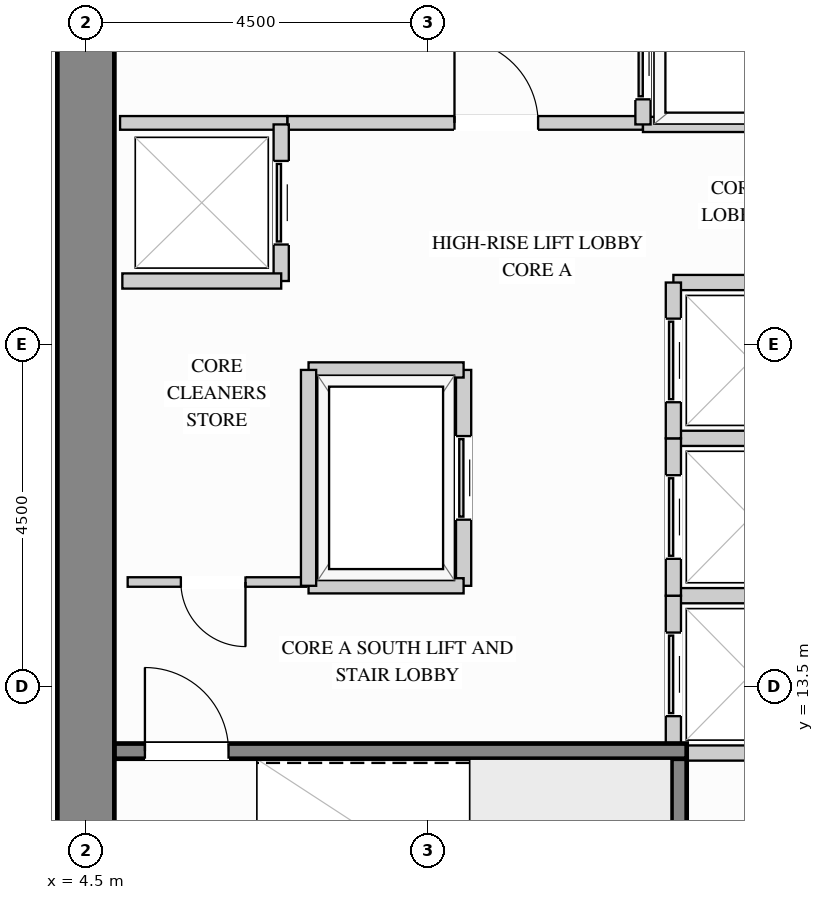
"""IFC4 building model, lengths in metres.
Left out: names, types, materials, properties, quantities, classifications, styles, units other than length and angle.
Written with IfcOpenShell. Run it as: python <this file> out.ifc"""

import sys

from ifc_helpers import new_model, si_unit, direction, frame, frame_2d, origin, place, context, subcontext, project, spatial, rectangle, extrude, source, transform, mapped, element, fill, save


model = new_model("IFC4")
c1 = context("Model", 3, precision=1e-05, world=origin(), true_north=direction((0.0, 1.0)))
c2 = subcontext(c1, "Body", "Model", "MODEL_VIEW")
j1 = project(units=[si_unit("LENGTHUNIT", "METRE"), si_unit("PLANEANGLEUNIT", "RADIAN")], contexts=[c1])
p1 = place(None, origin())
s1 = spatial("IfcSite", under=j1, at=p1, CompositionType="ELEMENT")
p2 = place(p1, origin())
s2 = spatial("IfcBuilding", under=s1, at=p2, CompositionType="ELEMENT")
p3 = place(p2, frame((0.0, 0.0, 113.4)))
s3 = spatial("IfcBuildingStorey", under=s2, at=p3, CompositionType="ELEMENT", Elevation=113.4)
m1 = source(origin(), c2, "Body", "SweptSolid", [
    extrude(rectangle(XDim=20.25, YDim=0.75, at=frame_2d((10.125, 0.0))), origin(), (0.0, 0.0, 1.0), 3.38),
])
p4 = place(p3, frame((4.5, 8.875, 0.0), z_axis=(0.0, 0.0, 1.0), x_axis=(0.0, 1.0, 0.0)))
e1 = element("IfcWall", 1, at=p4, inside=s3, PredefinedType="SHEAR", context=c2, shape_type="MappedRepresentation", body=[
    mapped(m1, transform((0.0, 0.0, 0.0), x_axis=(1.0, 0.0, 0.0), y_axis=(0.0, 1.0, 0.0), z_axis=(0.0, 0.0, 1.0))),
])
p5 = place(p3, frame((7.15, 20.92, 0.0), z_axis=(0.0, 0.0, 1.0), x_axis=(1.0, 0.0, 0.0)))
e2 = element("IfcWall", 2, at=p5, inside=s3, PredefinedType="PARTITIONING", context=c2, shape_type="SweptSolid", body=[
    extrude(rectangle(XDim=4.68, YDim=0.18, at=frame_2d((2.34, 0.0))), origin(), (0.0, 0.0, 1.0), 3.365),
])
p6 = place(p5, frame((2.2, 0.0, 0.0)))
e3 = element("IfcOpeningElement", 3, at=p6, cuts=e2, PredefinedType="OPENING", context=c2, shape_type="SweptSolid", body=[
    extrude(rectangle(XDim=1.1, YDim=2.15, at=frame_2d((0.55, 1.075))), frame((0.0, 0.1, 0.0), z_axis=(0.0, -1.0, 0.0), x_axis=(1.0, 0.0, 0.0)), (0.0, 0.0, 1.0), 0.2),
])
m2 = source(origin(), c2, "Body", "SweptSolid", [
    extrude(rectangle(XDim=2.2, YDim=0.18, at=frame_2d((1.1, 0.0))), origin(), (0.0, 0.0, 1.0), 3.365),
])
p7 = place(p3, frame((4.95, 20.92, 0.0), z_axis=(0.0, 0.0, 1.0), x_axis=(1.0, 0.0, 0.0)))
e4 = element("IfcWall", 4, at=p7, inside=s3, PredefinedType="PARTITIONING", context=c2, shape_type="MappedRepresentation", body=[
    mapped(m2, transform((0.0, 0.0, 0.0), x_axis=(1.0, 0.0, 0.0), y_axis=(0.0, 1.0, 0.0), z_axis=(0.0, 0.0, 1.0))),
])
p8 = place(p3, frame((5.05, 14.88, 0.0), z_axis=(0.0, 0.0, 1.0), x_axis=(1.0, 0.0, 0.0)))
e5 = element("IfcWall", 5, at=p8, inside=s3, PredefinedType="PARTITIONING", context=c2, shape_type="SweptSolid", body=[
    extrude(rectangle(XDim=2.35, YDim=0.125, at=frame_2d((1.175, 0.0))), origin(), (0.0, 0.0, 1.0), 3.365),
])
p9 = place(p8, frame((0.7, 0.0, 0.0)))
e6 = element("IfcOpeningElement", 6, at=p9, cuts=e5, PredefinedType="OPENING", context=c2, shape_type="SweptSolid", body=[
    extrude(rectangle(XDim=0.85, YDim=2.1, at=frame_2d((0.425, 1.05))), frame((0.0, 0.073, 0.0), z_axis=(0.0, -1.0, 0.0), x_axis=(1.0, 0.0, 0.0)), (0.0, 0.0, 1.0), 0.145),
])
m3 = source(origin(), c2, "Body", "SweptSolid", [
    extrude(rectangle(XDim=2.265, YDim=0.2, at=frame_2d((1.132, 0.0))), origin(), (0.0, 0.0, 1.0), 3.365),
])
p10 = place(p3, frame((11.83, 20.9, 0.0), z_axis=(0.0, 0.0, 1.0), x_axis=(1.0, 0.0, 0.0)))
e7 = element("IfcWall", 7, at=p10, inside=s3, PredefinedType="PARTITIONING", context=c2, shape_type="MappedRepresentation", body=[
    mapped(m3, transform((0.0, 0.0, 0.0), x_axis=(1.0, 0.0, 0.0), y_axis=(0.0, 1.0, 0.0), z_axis=(0.0, 0.0, 1.0))),
])
p11 = place(p3, frame((11.83, 20.9, 0.0), z_axis=(0.0, 0.0, 1.0), x_axis=(0.0, 1.0, 0.0)))
e8 = element("IfcWall", 8, at=p11, inside=s3, PredefinedType="PARTITIONING", context=c2, shape_type="SweptSolid", body=[
    extrude(rectangle(XDim=1.76, YDim=0.2, at=frame_2d((0.88, 0.0))), origin(), (0.0, 0.0, 1.0), 3.365),
])
p12 = place(p11, frame((0.33, 0.0, 0.0)))
e9 = element("IfcOpeningElement", 9, at=p12, cuts=e8, PredefinedType="OPENING", context=c2, shape_type="SweptSolid", body=[
    extrude(rectangle(XDim=1.1, YDim=2.2, at=frame_2d((0.55, 1.1))), frame((0.0, 0.11, 0.0), z_axis=(0.0, -1.0, 0.0), x_axis=(1.0, 0.0, 0.0)), (0.0, 0.0, 1.0), 0.22),
])
m4 = source(origin(), c2, "Body", "SweptSolid", [
    extrude(rectangle(XDim=1.865, YDim=0.2, at=frame_2d((0.933, 0.0))), origin(), (0.0, 0.0, 1.0), 3.365),
])
for number, where, z_axis, x_axis in (
    (10, (12.23, 14.7, 0.0), (0.0, 0.0, 1.0), (1.0, 0.0, 0.0)),
    (11, (12.23, 12.63, 0.0), (0.0, 0.0, 1.0), (1.0, 0.0, 0.0)),
):
    element("IfcWall", number, at=place(p3, frame(where, z_axis=z_axis, x_axis=x_axis)), inside=s3, PredefinedType="PARTITIONING", context=c2, shape_type="MappedRepresentation", body=[
        mapped(m4, transform((0.0, 0.0, 0.0), x_axis=(1.0, 0.0, 0.0), y_axis=(0.0, 1.0, 0.0), z_axis=(0.0, 0.0, 1.0))),
    ])
p13 = place(p3, frame((12.23, 12.63, 0.0), z_axis=(0.0, 0.0, 1.0), x_axis=(0.0, 1.0, 0.0)))
e12 = element("IfcWall", 12, at=p13, inside=s3, PredefinedType="PARTITIONING", context=c2, shape_type="SweptSolid", body=[
    extrude(rectangle(XDim=2.07, YDim=0.2, at=frame_2d((1.035, 0.0))), origin(), (0.0, 0.0, 1.0), 3.365),
])
p14 = place(p13, frame((0.485, 0.0, 0.0)))
e13 = element("IfcOpeningElement", 13, at=p14, cuts=e12, PredefinedType="OPENING", context=c2, shape_type="SweptSolid", body=[
    extrude(rectangle(XDim=1.1, YDim=2.2, at=frame_2d((0.55, 1.1))), frame((0.0, 0.11, 0.0), z_axis=(0.0, -1.0, 0.0), x_axis=(1.0, 0.0, 0.0)), (0.0, 0.0, 1.0), 0.22),
])
p15 = place(p3, frame((12.23, 16.77, 0.0), z_axis=(0.0, 0.0, 1.0), x_axis=(1.0, 0.0, 0.0)))
e14 = element("IfcWall", 14, at=p15, inside=s3, PredefinedType="PARTITIONING", context=c2, shape_type="MappedRepresentation", body=[
    mapped(m4, transform((0.0, 0.0, 0.0), x_axis=(1.0, 0.0, 0.0), y_axis=(0.0, 1.0, 0.0), z_axis=(0.0, 0.0, 1.0))),
])
p16 = place(p3, frame((12.23, 14.7, 0.0), z_axis=(0.0, 0.0, 1.0), x_axis=(0.0, 1.0, 0.0)))
e15 = element("IfcWall", 15, at=p16, inside=s3, PredefinedType="PARTITIONING", context=c2, shape_type="SweptSolid", body=[
    extrude(rectangle(XDim=2.07, YDim=0.2, at=frame_2d((1.035, 0.0))), origin(), (0.0, 0.0, 1.0), 3.365),
])
p17 = place(p16, frame((0.485, 0.0, 0.0)))
e16 = element("IfcOpeningElement", 16, at=p17, cuts=e15, PredefinedType="OPENING", context=c2, shape_type="SweptSolid", body=[
    extrude(rectangle(XDim=1.1, YDim=2.2, at=frame_2d((0.55, 1.1))), frame((0.0, 0.11, 0.0), z_axis=(0.0, -1.0, 0.0), x_axis=(1.0, 0.0, 0.0)), (0.0, 0.0, 1.0), 0.22),
])
p18 = place(p3, frame((12.23, 18.82, 0.0), z_axis=(0.0, 0.0, 1.0), x_axis=(1.0, 0.0, 0.0)))
e17 = element("IfcWall", 17, at=p18, inside=s3, PredefinedType="PARTITIONING", context=c2, shape_type="MappedRepresentation", body=[
    mapped(m4, transform((0.0, 0.0, 0.0), x_axis=(1.0, 0.0, 0.0), y_axis=(0.0, 1.0, 0.0), z_axis=(0.0, 0.0, 1.0))),
])
p19 = place(p3, frame((12.23, 16.77, 0.0), z_axis=(0.0, 0.0, 1.0), x_axis=(0.0, 1.0, 0.0)))
e18 = element("IfcWall", 18, at=p19, inside=s3, PredefinedType="PARTITIONING", context=c2, shape_type="SweptSolid", body=[
    extrude(rectangle(XDim=2.05, YDim=0.2, at=frame_2d((1.025, 0.0))), origin(), (0.0, 0.0, 1.0), 3.365),
])
p20 = place(p19, frame((0.475, 0.0, 0.0)))
e19 = element("IfcOpeningElement", 19, at=p20, cuts=e18, PredefinedType="OPENING", context=c2, shape_type="SweptSolid", body=[
    extrude(rectangle(XDim=1.1, YDim=2.2, at=frame_2d((0.55, 1.1))), frame((0.0, 0.11, 0.0), z_axis=(0.0, -1.0, 0.0), x_axis=(1.0, 0.0, 0.0)), (0.0, 0.0, 1.0), 0.22),
])
p21 = place(p3, frame((7.07, 18.84, 0.0), z_axis=(0.0, 0.0, 1.0), x_axis=(0.0, 1.0, 0.0)))
e20 = element("IfcWall", 20, at=p21, inside=s3, PredefinedType="PARTITIONING", context=c2, shape_type="SweptSolid", body=[
    extrude(rectangle(XDim=2.06, YDim=0.2, at=frame_2d((1.03, 0.0))), origin(), (0.0, 0.0, 1.0), 3.365),
])
p22 = place(p21, frame((0.48, 0.0, 0.0)))
e21 = element("IfcOpeningElement", 21, at=p22, cuts=e20, PredefinedType="OPENING", context=c2, shape_type="SweptSolid", body=[
    extrude(rectangle(XDim=1.1, YDim=2.2, at=frame_2d((0.55, 1.1))), frame((0.0, 0.11, 0.0), z_axis=(0.0, -1.0, 0.0), x_axis=(1.0, 0.0, 0.0)), (0.0, 0.0, 1.0), 0.22),
])
m5 = source(origin(), c2, "Body", "SweptSolid", [
    extrude(rectangle(XDim=2.09, YDim=0.2, at=frame_2d((1.045, 0.0))), origin(), (0.0, 0.0, 1.0), 3.365),
])
p23 = place(p3, frame((4.98, 18.84, 0.0), z_axis=(0.0, 0.0, 1.0), x_axis=(1.0, 0.0, 0.0)))
e22 = element("IfcWall", 22, at=p23, inside=s3, PredefinedType="PARTITIONING", context=c2, shape_type="MappedRepresentation", body=[
    mapped(m5, transform((0.0, 0.0, 0.0), x_axis=(1.0, 0.0, 0.0), y_axis=(0.0, 1.0, 0.0), z_axis=(0.0, 0.0, 1.0))),
])
p24 = place(p3, frame((9.47, 14.83, 0.0), z_axis=(0.0, 0.0, 1.0), x_axis=(0.0, 1.0, 0.0)))
e23 = element("IfcWall", 23, at=p24, inside=s3, PredefinedType="PARTITIONING", context=c2, shape_type="SweptSolid", body=[
    extrude(rectangle(XDim=2.84, YDim=0.2, at=frame_2d((1.42, 0.0))), origin(), (0.0, 0.0, 1.0), 3.365),
])
p25 = place(p24, frame((0.87, 0.0, 0.0)))
e24 = element("IfcOpeningElement", 24, at=p25, cuts=e23, PredefinedType="OPENING", context=c2, shape_type="SweptSolid", body=[
    extrude(rectangle(XDim=1.1, YDim=2.2, at=frame_2d((0.55, 1.1))), frame((0.0, 0.11, 0.0), z_axis=(0.0, -1.0, 0.0), x_axis=(1.0, 0.0, 0.0)), (0.0, 0.0, 1.0), 0.22),
])
m6 = source(origin(), c2, "Body", "SweptSolid", [
    extrude(rectangle(XDim=2.04, YDim=0.2, at=frame_2d((1.02, 0.0))), origin(), (0.0, 0.0, 1.0), 3.365),
])
for number, where, z_axis, x_axis in (
    (25, (7.43, 17.67, 0.0), (0.0, 0.0, 1.0), (1.0, 0.0, 0.0)),
    (26, (7.43, 14.83, 0.0), (0.0, 0.0, 1.0), (1.0, 0.0, 0.0)),
):
    element("IfcWall", number, at=place(p3, frame(where, z_axis=z_axis, x_axis=x_axis)), inside=s3, PredefinedType="PARTITIONING", context=c2, shape_type="MappedRepresentation", body=[
        mapped(m6, transform((0.0, 0.0, 0.0), x_axis=(1.0, 0.0, 0.0), y_axis=(0.0, 1.0, 0.0), z_axis=(0.0, 0.0, 1.0))),
    ])
m7 = source(origin(), c2, "Body", "SweptSolid", [
    extrude(rectangle(XDim=2.84, YDim=0.2, at=frame_2d((1.42, 0.0))), origin(), (0.0, 0.0, 1.0), 3.365),
])
p26 = place(p3, frame((7.43, 14.83, 0.0), z_axis=(0.0, 0.0, 1.0), x_axis=(0.0, 1.0, 0.0)))
e27 = element("IfcWall", 27, at=p26, inside=s3, PredefinedType="PARTITIONING", context=c2, shape_type="MappedRepresentation", body=[
    mapped(m7, transform((0.0, 0.0, 0.0), x_axis=(1.0, 0.0, 0.0), y_axis=(0.0, 1.0, 0.0), z_axis=(0.0, 0.0, 1.0))),
])
m8 = source(origin(), c2, "Body", "SweptSolid", [
    extrude(rectangle(XDim=3.678, YDim=0.2, at=frame_2d((1.839, 0.0))), origin(), (0.0, 0.0, 1.0), 3.38),
])
p27 = place(p3, frame((12.305, 8.877, 0.0), z_axis=(0.0, 0.0, 1.0), x_axis=(0.0, 1.0, 0.0)))
e28 = element("IfcWall", 28, at=p27, inside=s3, PredefinedType="SHEAR", context=c2, shape_type="MappedRepresentation", body=[
    mapped(m8, transform((0.0, 0.0, 0.0), x_axis=(1.0, 0.0, 0.0), y_axis=(0.0, 1.0, 0.0), z_axis=(0.0, 0.0, 1.0))),
])
p28 = place(p3, frame((4.877, 12.655, 0.0), z_axis=(0.0, 0.0, 1.0), x_axis=(1.0, 0.0, 0.0)))
e29 = element("IfcWall", 29, at=p28, inside=s3, PredefinedType="SHEAR", context=c2, shape_type="SweptSolid", body=[
    extrude(rectangle(XDim=7.528, YDim=0.2, at=frame_2d((3.764, 0.0))), origin(), (0.0, 0.0, 1.0), 3.38),
])
p29 = place(p28, frame((0.4, 0.0, 0.0)))
e30 = element("IfcOpeningElement", 30, at=p29, cuts=e29, PredefinedType="OPENING", context=c2, shape_type="SweptSolid", body=[
    extrude(rectangle(XDim=1.1, YDim=2.15, at=frame_2d((0.55, 1.075))), frame((0.0, 0.11, 0.0), z_axis=(0.0, -1.0, 0.0), x_axis=(1.0, 0.0, 0.0)), (0.0, 0.0, 1.0), 0.22),
])
m9 = source(origin(), c2, "Body", "SweptSolid", [
    extrude(rectangle(XDim=1.1, YDim=2.15, at=frame_2d((0.55, 1.075))), frame((0.0, 0.025, 0.0), z_axis=(0.0, -1.0, 0.0), x_axis=(1.0, 0.0, 0.0)), (0.0, 0.0, 1.0), 0.05),
])
p30 = place(p6, origin())
e31 = element("IfcDoor", 31, at=p30, inside=s3, OperationType="SINGLE_SWING_LEFT", PredefinedType="DOOR", context=c2, shape_type="MappedRepresentation", body=[
    mapped(m9, transform((0.0, 0.0, 0.0), x_axis=(1.0, 0.0, 0.0), y_axis=(0.0, 1.0, 0.0), z_axis=(0.0, 0.0, 1.0))),
])
fill(e3, e31)
m10 = source(origin(), c2, "Body", "SweptSolid", [
    extrude(rectangle(XDim=1.1, YDim=2.2, at=frame_2d((0.55, 1.1))), frame((0.0, 0.025, 0.0), z_axis=(0.0, -1.0, 0.0), x_axis=(1.0, 0.0, 0.0)), (0.0, 0.0, 1.0), 0.05),
])
p31 = place(p12, origin())
e32 = element("IfcDoor", 32, at=p31, inside=s3, OperationType="SLIDING_TO_LEFT", PredefinedType="DOOR", context=c2, shape_type="MappedRepresentation", body=[
    mapped(m10, transform((0.0, 0.0, 0.0), x_axis=(1.0, 0.0, 0.0), y_axis=(0.0, 1.0, 0.0), z_axis=(0.0, 0.0, 1.0))),
])
fill(e9, e32)
p32 = place(p14, origin())
e33 = element("IfcDoor", 33, at=p32, inside=s3, OperationType="SLIDING_TO_LEFT", PredefinedType="DOOR", context=c2, shape_type="MappedRepresentation", body=[
    mapped(m10, transform((0.0, 0.0, 0.0), x_axis=(1.0, 0.0, 0.0), y_axis=(0.0, 1.0, 0.0), z_axis=(0.0, 0.0, 1.0))),
])
fill(e13, e33)
p33 = place(p17, origin())
e34 = element("IfcDoor", 34, at=p33, inside=s3, OperationType="SLIDING_TO_LEFT", PredefinedType="DOOR", context=c2, shape_type="MappedRepresentation", body=[
    mapped(m10, transform((0.0, 0.0, 0.0), x_axis=(1.0, 0.0, 0.0), y_axis=(0.0, 1.0, 0.0), z_axis=(0.0, 0.0, 1.0))),
])
fill(e16, e34)
p34 = place(p20, origin())
e35 = element("IfcDoor", 35, at=p34, inside=s3, OperationType="SLIDING_TO_LEFT", PredefinedType="DOOR", context=c2, shape_type="MappedRepresentation", body=[
    mapped(m10, transform((0.0, 0.0, 0.0), x_axis=(1.0, 0.0, 0.0), y_axis=(0.0, 1.0, 0.0), z_axis=(0.0, 0.0, 1.0))),
])
fill(e19, e35)
p35 = place(p22, origin())
e36 = element("IfcDoor", 36, at=p35, inside=s3, OperationType="SLIDING_TO_LEFT", PredefinedType="DOOR", context=c2, shape_type="MappedRepresentation", body=[
    mapped(m10, transform((0.0, 0.0, 0.0), x_axis=(1.0, 0.0, 0.0), y_axis=(0.0, 1.0, 0.0), z_axis=(0.0, 0.0, 1.0))),
])
fill(e21, e36)
p36 = place(p25, origin())
e37 = element("IfcDoor", 37, at=p36, inside=s3, OperationType="SLIDING_TO_LEFT", PredefinedType="DOOR", context=c2, shape_type="MappedRepresentation", body=[
    mapped(m10, transform((0.0, 0.0, 0.0), x_axis=(1.0, 0.0, 0.0), y_axis=(0.0, 1.0, 0.0), z_axis=(0.0, 0.0, 1.0))),
])
fill(e24, e37)
m11 = source(origin(), c2, "Body", "SweptSolid", [
    extrude(rectangle(XDim=0.85, YDim=2.1, at=frame_2d((0.425, 1.05))), frame((0.0, 0.025, 0.0), z_axis=(0.0, -1.0, 0.0), x_axis=(1.0, 0.0, 0.0)), (0.0, 0.0, 1.0), 0.05),
])
p37 = place(p9, origin())
e38 = element("IfcDoor", 38, at=p37, inside=s3, OperationType="SINGLE_SWING_RIGHT", PredefinedType="DOOR", context=c2, shape_type="MappedRepresentation", body=[
    mapped(m11, transform((0.0, 0.0, 0.0), x_axis=(1.0, 0.0, 0.0), y_axis=(0.0, 1.0, 0.0), z_axis=(0.0, 0.0, 1.0))),
])
fill(e6, e38)
m12 = source(origin(), c2, "Body", "SweptSolid", [
    extrude(rectangle(XDim=1.1, YDim=2.15, at=frame_2d((0.55, 1.075))), frame((0.0, 0.025, 0.0), z_axis=(0.0, -1.0, 0.0), x_axis=(1.0, 0.0, 0.0)), (0.0, 0.0, 1.0), 0.05),
])
p38 = place(p29, origin())
e39 = element("IfcDoor", 39, at=p38, inside=s3, OperationType="SINGLE_SWING_LEFT", PredefinedType="DOOR", context=c2, shape_type="MappedRepresentation", body=[
    mapped(m12, transform((0.0, 0.0, 0.0), x_axis=(1.0, 0.0, 0.0), y_axis=(0.0, 1.0, 0.0), z_axis=(0.0, 0.0, 1.0))),
])
fill(e30, e39)
save(model, sys.argv[1])
